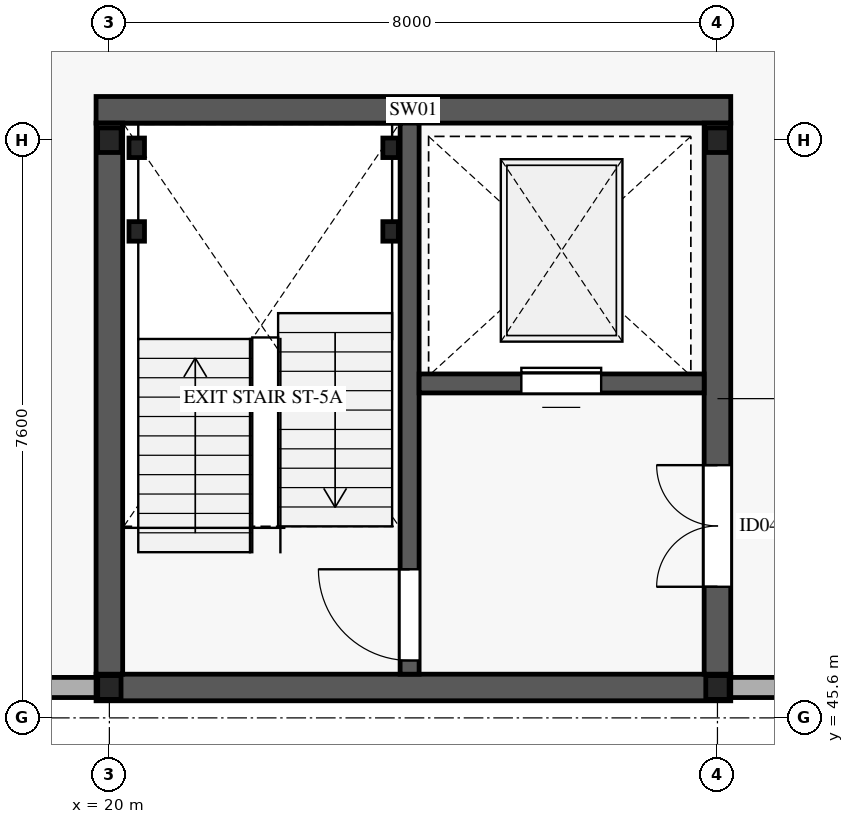
"""IFC4 building model, lengths in metres.
Left out: names, types, materials, properties, quantities, classifications, styles, units other than length and angle.
Written with IfcOpenShell. Run it as: python <this file> out.ifc"""

import sys

from ifc_helpers import new_model, si_unit, direction, frame, frame_2d, origin, origin_2d, place, context, subcontext, project, spatial, rectangle, i_section, extrude, element, fill, save


model = new_model("IFC4")
c1 = context("Model", 3, precision=1e-05, world=origin(), true_north=direction((0.0, 1.0)))
c2 = subcontext(c1, "Body", "Model", "MODEL_VIEW")
j1 = project(units=[si_unit("LENGTHUNIT", "METRE"), si_unit("PLANEANGLEUNIT", "RADIAN")], contexts=[c1])
p1 = place(None, origin())
s1 = spatial("IfcSite", under=j1, at=p1, CompositionType="ELEMENT")
p2 = place(p1, origin())
s2 = spatial("IfcBuilding", under=s1, at=p2, CompositionType="ELEMENT")
p3 = place(p2, frame((0.0, 0.0, 29.4)))
s3 = spatial("IfcBuildingStorey", under=s2, at=p3, CompositionType="ELEMENT", Elevation=29.4)
p4 = place(p3, frame((20.0, 46.0, 0.0), z_axis=(0.0, 0.0, 1.0), x_axis=(1.0, 0.0, 0.0)))
e1 = element("IfcColumn", 1, at=p4, inside=s3, PredefinedType="COLUMN", context=c2, shape_type="SweptSolid", body=[
    extrude(i_section(OverallWidth=0.307, OverallDepth=0.314, WebThickness=0.012, FlangeThickness=0.019, FilletRadius=0.015, at=origin_2d()), origin(), (0.0, 0.0, 1.0), 4.0),
])
p5 = place(p3, frame((20.0, 53.2, 0.0), z_axis=(0.0, 0.0, 1.0), x_axis=(1.0, 0.0, 0.0)))
e2 = element("IfcColumn", 2, at=p5, inside=s3, PredefinedType="COLUMN", context=c2, shape_type="SweptSolid", body=[
    extrude(i_section(OverallWidth=0.309, OverallDepth=0.323, WebThickness=0.014, FlangeThickness=0.023, FilletRadius=0.015, at=origin_2d()), origin(), (0.0, 0.0, 1.0), 4.0),
])
p6 = place(p3, frame((28.0, 46.0, 0.0), z_axis=(0.0, 0.0, 1.0), x_axis=(1.0, 0.0, 0.0)))
e3 = element("IfcColumn", 3, at=p6, inside=s3, PredefinedType="COLUMN", context=c2, shape_type="SweptSolid", body=[
    extrude(i_section(OverallWidth=0.307, OverallDepth=0.314, WebThickness=0.012, FlangeThickness=0.019, FilletRadius=0.015, at=origin_2d()), origin(), (0.0, 0.0, 1.0), 4.0),
])
p7 = place(p3, frame((28.0, 53.2, 0.0), z_axis=(0.0, 0.0, 1.0), x_axis=(1.0, 0.0, 0.0)))
e4 = element("IfcColumn", 4, at=p7, inside=s3, PredefinedType="COLUMN", context=c2, shape_type="SweptSolid", body=[
    extrude(i_section(OverallWidth=0.309, OverallDepth=0.323, WebThickness=0.014, FlangeThickness=0.023, FilletRadius=0.015, at=origin_2d()), origin(), (0.0, 0.0, 1.0), 4.0),
])
p8 = place(p3, frame((36.02, 46.0, 0.0), z_axis=(0.0, 0.0, 1.0), x_axis=(-1.0, 0.0, 0.0)))
e5 = element("IfcWall", 5, at=p8, inside=s3, PredefinedType="STANDARD", context=c2, shape_type="SweptSolid", body=[
    extrude(rectangle(XDim=8.04, YDim=0.265, at=frame_2d((4.02, 0.0))), origin(), (0.0, 0.0, 1.0), 3.06),
])
p9 = place(p8, frame((3.195, 0.0, 0.75)))
e6 = element("IfcOpeningElement", 6, at=p9, cuts=e5, PredefinedType="OPENING", context=c2, shape_type="SweptSolid", body=[
    extrude(rectangle(XDim=1.65, YDim=1.55, at=frame_2d((0.825, 0.775))), frame((0.0, 0.142, 0.0), z_axis=(0.0, -1.0, 0.0), x_axis=(1.0, 0.0, 0.0)), (0.0, 0.0, 1.0), 0.285),
])
p10 = place(p3, frame((20.02, 46.0, 0.0), z_axis=(0.0, 0.0, 1.0), x_axis=(-1.0, 0.0, 0.0)))
e7 = element("IfcWall", 7, at=p10, inside=s3, PredefinedType="STANDARD", context=c2, shape_type="SweptSolid", body=[
    extrude(rectangle(XDim=8.04, YDim=0.265, at=frame_2d((4.02, 0.0))), origin(), (0.0, 0.0, 1.0), 3.06),
])
p11 = place(p10, frame((2.995, 0.0, 0.75)))
e8 = element("IfcOpeningElement", 8, at=p11, cuts=e7, PredefinedType="OPENING", context=c2, shape_type="SweptSolid", body=[
    extrude(rectangle(XDim=2.05, YDim=1.55, at=frame_2d((1.025, 0.775))), frame((0.0, 0.142, 0.0), z_axis=(0.0, -1.0, 0.0), x_axis=(1.0, 0.0, 0.0)), (0.0, 0.0, 1.0), 0.285),
])
for number, where, z_axis, x_axis in (
    (9, (19.825, 46.0, 0.0), (0.0, 0.0, 1.0), (1.0, 0.0, 0.0)),
    (10, (19.825, 53.6, 0.0), (0.0, 0.0, 1.0), (1.0, 0.0, 0.0)),
):
    element("IfcWall", number, at=place(p3, frame(where, z_axis=z_axis, x_axis=x_axis)), inside=s3, PredefinedType="SHEAR", context=c2, shape_type="SweptSolid", body=[
        extrude(rectangle(XDim=8.35, YDim=0.35, at=frame_2d((4.175, 0.0))), origin(), (0.0, 0.0, 1.0), 3.99),
    ])
p12 = place(p3, frame((20.0, 46.175, 0.0), z_axis=(0.0, 0.0, 1.0), x_axis=(0.0, 1.0, 0.0)))
e11 = element("IfcWall", 11, at=p12, inside=s3, PredefinedType="SHEAR", context=c2, shape_type="SweptSolid", body=[
    extrude(rectangle(XDim=7.25, YDim=0.35, at=frame_2d((3.625, 0.0))), origin(), (0.0, 0.0, 1.0), 3.99),
])
p13 = place(p3, frame((28.0, 46.175, 0.0), z_axis=(0.0, 0.0, 1.0), x_axis=(0.0, 1.0, 0.0)))
e12 = element("IfcWall", 12, at=p13, inside=s3, PredefinedType="SHEAR", context=c2, shape_type="SweptSolid", body=[
    extrude(rectangle(XDim=7.25, YDim=0.35, at=frame_2d((3.625, 0.0))), origin(), (0.0, 0.0, 1.0), 3.99),
])
p14 = place(p13, frame((1.15, 0.0, 0.0)))
e13 = element("IfcOpeningElement", 13, at=p14, cuts=e12, PredefinedType="OPENING", context=c2, shape_type="SweptSolid", body=[
    extrude(rectangle(XDim=1.6, YDim=2.35, at=frame_2d((0.8, 1.175))), frame((0.0, 0.185, 0.0), z_axis=(0.0, -1.0, 0.0), x_axis=(1.0, 0.0, 0.0)), (0.0, 0.0, 1.0), 0.37),
])
p15 = place(p3, frame((23.95, 46.175, 0.0), z_axis=(0.0, 0.0, 1.0), x_axis=(0.0, 1.0, 0.0)))
e14 = element("IfcWall", 14, at=p15, inside=s3, PredefinedType="SHEAR", context=c2, shape_type="SweptSolid", body=[
    extrude(rectangle(XDim=7.25, YDim=0.25, at=frame_2d((3.625, 0.0))), origin(), (0.0, 0.0, 1.0), 3.99),
])
p16 = place(p15, frame((0.18, 0.0, 0.0)))
e15 = element("IfcOpeningElement", 15, at=p16, cuts=e14, PredefinedType="OPENING", context=c2, shape_type="SweptSolid", body=[
    extrude(rectangle(XDim=1.2, YDim=2.2, at=frame_2d((0.6, 1.1))), frame((0.0, 0.135, 0.0), z_axis=(0.0, -1.0, 0.0), x_axis=(1.0, 0.0, 0.0)), (0.0, 0.0, 1.0), 0.27),
])
p17 = place(p3, frame((24.075, 50.0, 0.0), z_axis=(0.0, 0.0, 1.0), x_axis=(1.0, 0.0, 0.0)))
e16 = element("IfcWall", 16, at=p17, inside=s3, PredefinedType="SHEAR", context=c2, shape_type="SweptSolid", body=[
    extrude(rectangle(XDim=3.75, YDim=0.25, at=frame_2d((1.875, 0.0))), origin(), (0.0, 0.0, 1.0), 3.99),
])
p18 = place(p17, frame((1.345, 0.0, 0.0)))
e17 = element("IfcOpeningElement", 17, at=p18, cuts=e16, PredefinedType="OPENING", context=c2, shape_type="SweptSolid", body=[
    extrude(rectangle(XDim=1.05, YDim=2.2, at=frame_2d((0.525, 1.1))), frame((0.0, 0.135, 0.0), z_axis=(0.0, -1.0, 0.0), x_axis=(1.0, 0.0, 0.0)), (0.0, 0.0, 1.0), 0.27),
])
for number, where, z_axis, x_axis in (
    (18, (20.36, 52.0, 0.0), (0.0, 0.0, 1.0), (1.0, 0.0, 0.0)),
    (19, (23.7, 52.0, 0.0), (0.0, 0.0, 1.0), (1.0, 0.0, 0.0)),
    (20, (20.36, 53.1, 0.0), (0.0, 0.0, 1.0), (1.0, 0.0, 0.0)),
    (21, (23.7, 53.1, 0.0), (0.0, 0.0, 1.0), (1.0, 0.0, 0.0)),
):
    element("IfcColumn", number, at=place(p3, frame(where, z_axis=z_axis, x_axis=x_axis)), inside=s3, PredefinedType="COLUMN", context=c2, shape_type="SweptSolid", body=[
        extrude(i_section(OverallWidth=0.204, OverallDepth=0.257, WebThickness=0.009, FlangeThickness=0.016, FilletRadius=0.013, at=origin_2d()), origin(), (0.0, 0.0, 1.0), 4.195),
    ])
p19 = place(p16, origin())
e22 = element("IfcDoor", 22, at=p19, inside=s3, OperationType="SINGLE_SWING_RIGHT", PredefinedType="DOOR", context=c2, shape_type="SweptSolid", body=[
    extrude(rectangle(XDim=1.2, YDim=2.2, at=frame_2d((0.6, 1.1))), frame((0.0, 0.025, 0.0), z_axis=(0.0, -1.0, 0.0), x_axis=(1.0, 0.0, 0.0)), (0.0, 0.0, 1.0), 0.05),
])
fill(e15, e22)
p20 = place(p14, origin())
e23 = element("IfcDoor", 23, at=p20, inside=s3, OperationType="DOUBLE_DOOR_SINGLE_SWING", PredefinedType="DOOR", context=c2, shape_type="SweptSolid", body=[
    extrude(rectangle(XDim=1.6, YDim=2.35, at=frame_2d((0.8, 1.175))), frame((0.0, 0.025, 0.0), z_axis=(0.0, -1.0, 0.0), x_axis=(1.0, 0.0, 0.0)), (0.0, 0.0, 1.0), 0.05),
])
fill(e13, e23)
p21 = place(p18, origin())
e24 = element("IfcDoor", 24, at=p21, inside=s3, OperationType="SLIDING_TO_RIGHT", PredefinedType="DOOR", context=c2, shape_type="SweptSolid", body=[
    extrude(rectangle(XDim=1.05, YDim=2.2, at=frame_2d((0.525, 1.1))), frame((0.0, 0.025, 0.0), z_axis=(0.0, -1.0, 0.0), x_axis=(1.0, 0.0, 0.0)), (0.0, 0.0, 1.0), 0.05),
])
fill(e17, e24)
save(model, sys.argv[1])
